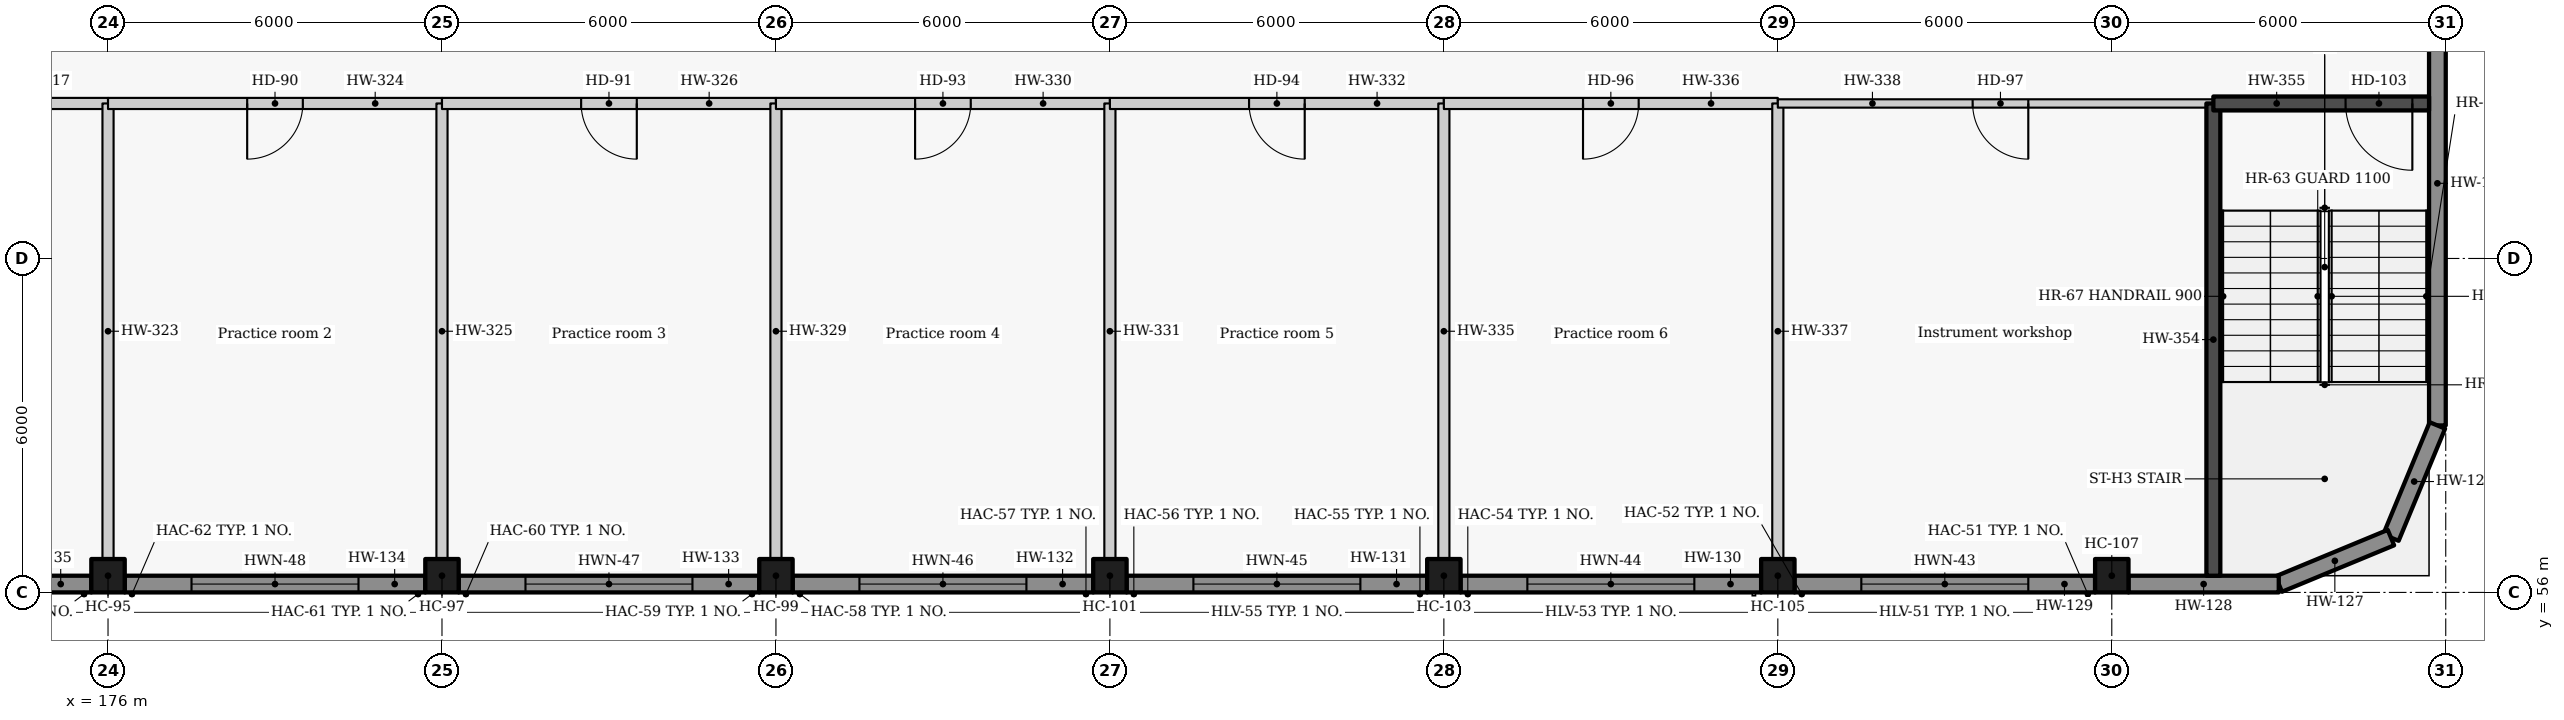
"""IFC4 building model, lengths in metres.
Left out: names, types, materials, properties, quantities, classifications, styles, units other than length and angle.
Written with IfcOpenShell. Run it as: python <this file> out.ifc"""

import sys

from ifc_helpers import new_model, si_unit, direction, frame, frame_2d, origin, origin_2d, place, context, subcontext, project, spatial, rectangle, extrude, element, fill, save


model = new_model("IFC4")
c1 = context("Model", 3, precision=1e-05, world=origin(), true_north=direction((0.0, 1.0)))
c2 = subcontext(c1, "Body", "Model", "MODEL_VIEW")
j1 = project(units=[si_unit("LENGTHUNIT", "METRE"), si_unit("PLANEANGLEUNIT", "RADIAN")], contexts=[c1])
p1 = place(None, origin())
s1 = spatial("IfcSite", under=j1, at=p1, CompositionType="ELEMENT")
p2 = place(p1, origin())
s2 = spatial("IfcBuilding", under=s1, at=p2, CompositionType="ELEMENT")
p3 = place(p2, frame((0.0, 0.0, 11.4)))
s3 = spatial("IfcBuildingStorey", under=s2, at=p3, CompositionType="ELEMENT", Elevation=11.4)
for number, where, z_axis, x_axis in (
    (1, (176.0, 56.3, 0.0), (0.0, 0.0, 1.0), (1.0, 0.0, 0.0)),
    (2, (182.0, 56.3, 0.0), (0.0, 0.0, 1.0), (1.0, 0.0, 0.0)),
    (3, (188.0, 56.3, 0.0), (0.0, 0.0, 1.0), (1.0, 0.0, 0.0)),
    (4, (194.0, 56.3, 0.0), (0.0, 0.0, 1.0), (1.0, 0.0, 0.0)),
    (5, (200.0, 56.3, 0.0), (0.0, 0.0, 1.0), (1.0, 0.0, 0.0)),
    (6, (206.0, 56.3, 0.0), (0.0, 0.0, 1.0), (1.0, 0.0, 0.0)),
    (7, (212.0, 56.3, 0.0), (0.0, 0.0, 1.0), (1.0, 0.0, 0.0)),
):
    element("IfcColumn", number, at=place(p3, frame(where, z_axis=z_axis, x_axis=x_axis)), inside=s3, PredefinedType="COLUMN", context=c2, shape_type="SweptSolid", body=[
        extrude(rectangle(XDim=0.6, YDim=0.6, at=origin_2d()), origin(), (0.0, 0.0, 1.0), 4.2),
    ])
p4 = place(p3, frame((217.85, 67.7, 0.0), z_axis=(0.0, 0.0, 1.0), x_axis=(0.0, -1.0, 0.0)))
e8 = element("IfcWall", 8, at=p4, inside=s3, PredefinedType="SOLIDWALL", context=c2, shape_type="SweptSolid", body=[
    extrude(rectangle(XDim=8.7, YDim=0.3, at=frame_2d((4.35, 0.0))), origin(), (0.0, 0.0, 1.0), 4.2),
])
for number, where, z_axis, x_axis in (
    (9, (217.85, 59.0, 0.0), (0.0, 0.0, 1.0), (-0.383, -0.924, 0.0)),
    (10, (217.015, 56.985, 0.0), (0.0, 0.0, 1.0), (-0.924, -0.383, 0.0)),
):
    element("IfcWall", number, at=place(p3, frame(where, z_axis=z_axis, x_axis=x_axis)), inside=s3, PredefinedType="SOLIDWALL", context=c2, shape_type="SweptSolid", body=[
        extrude(rectangle(XDim=2.181, YDim=0.3, at=frame_2d((1.091, 0.0))), origin(), (0.0, 0.0, 1.0), 4.2),
    ])
p5 = place(p3, frame((215.0, 56.15, 0.0), z_axis=(0.0, 0.0, 1.0), x_axis=(-1.0, 0.0, 0.0)))
e11 = element("IfcWall", 11, at=p5, inside=s3, PredefinedType="SOLIDWALL", context=c2, shape_type="SweptSolid", body=[
    extrude(rectangle(XDim=2.7, YDim=0.3, at=frame_2d((1.35, 0.0))), origin(), (0.0, 0.0, 1.0), 4.2),
])
p6 = place(p3, frame((211.7, 56.15, 0.0), z_axis=(0.0, 0.0, 1.0), x_axis=(-1.0, 0.0, 0.0)))
e12 = element("IfcWall", 12, at=p6, inside=s3, PredefinedType="SOLIDWALL", context=c2, shape_type="SweptSolid", body=[
    extrude(rectangle(XDim=5.4, YDim=0.3, at=frame_2d((2.7, 0.0))), origin(), (0.0, 0.0, 1.0), 4.2),
])
p7 = place(p6, frame((1.2, 0.0, 0.9)))
e13 = element("IfcOpeningElement", 13, at=p7, cuts=e12, PredefinedType="OPENING", context=c2, shape_type="SweptSolid", body=[
    extrude(rectangle(XDim=3.0, YDim=1.8, at=frame_2d((1.5, 0.9))), frame((0.0, 0.16, 0.0), z_axis=(0.0, -1.0, 0.0), x_axis=(1.0, 0.0, 0.0)), (0.0, 0.0, 1.0), 0.32),
])
p8 = place(p3, frame((205.7, 56.15, 0.0), z_axis=(0.0, 0.0, 1.0), x_axis=(-1.0, 0.0, 0.0)))
e14 = element("IfcWall", 14, at=p8, inside=s3, PredefinedType="SOLIDWALL", context=c2, shape_type="SweptSolid", body=[
    extrude(rectangle(XDim=5.4, YDim=0.3, at=frame_2d((2.7, 0.0))), origin(), (0.0, 0.0, 1.0), 4.2),
])
p9 = place(p8, frame((1.2, 0.0, 0.9)))
e15 = element("IfcOpeningElement", 15, at=p9, cuts=e14, PredefinedType="OPENING", context=c2, shape_type="SweptSolid", body=[
    extrude(rectangle(XDim=3.0, YDim=1.8, at=frame_2d((1.5, 0.9))), frame((0.0, 0.16, 0.0), z_axis=(0.0, -1.0, 0.0), x_axis=(1.0, 0.0, 0.0)), (0.0, 0.0, 1.0), 0.32),
])
p10 = place(p3, frame((199.7, 56.15, 0.0), z_axis=(0.0, 0.0, 1.0), x_axis=(-1.0, 0.0, 0.0)))
e16 = element("IfcWall", 16, at=p10, inside=s3, PredefinedType="SOLIDWALL", context=c2, shape_type="SweptSolid", body=[
    extrude(rectangle(XDim=5.4, YDim=0.3, at=frame_2d((2.7, 0.0))), origin(), (0.0, 0.0, 1.0), 4.2),
])
p11 = place(p10, frame((1.2, 0.0, 0.9)))
e17 = element("IfcOpeningElement", 17, at=p11, cuts=e16, PredefinedType="OPENING", context=c2, shape_type="SweptSolid", body=[
    extrude(rectangle(XDim=3.0, YDim=1.8, at=frame_2d((1.5, 0.9))), frame((0.0, 0.16, 0.0), z_axis=(0.0, -1.0, 0.0), x_axis=(1.0, 0.0, 0.0)), (0.0, 0.0, 1.0), 0.32),
])
p12 = place(p3, frame((193.7, 56.15, 0.0), z_axis=(0.0, 0.0, 1.0), x_axis=(-1.0, 0.0, 0.0)))
e18 = element("IfcWall", 18, at=p12, inside=s3, PredefinedType="SOLIDWALL", context=c2, shape_type="SweptSolid", body=[
    extrude(rectangle(XDim=5.4, YDim=0.3, at=frame_2d((2.7, 0.0))), origin(), (0.0, 0.0, 1.0), 4.2),
])
p13 = place(p12, frame((1.2, 0.0, 0.9)))
e19 = element("IfcOpeningElement", 19, at=p13, cuts=e18, PredefinedType="OPENING", context=c2, shape_type="SweptSolid", body=[
    extrude(rectangle(XDim=3.0, YDim=1.8, at=frame_2d((1.5, 0.9))), frame((0.0, 0.16, 0.0), z_axis=(0.0, -1.0, 0.0), x_axis=(1.0, 0.0, 0.0)), (0.0, 0.0, 1.0), 0.32),
])
p14 = place(p3, frame((187.7, 56.15, 0.0), z_axis=(0.0, 0.0, 1.0), x_axis=(-1.0, 0.0, 0.0)))
e20 = element("IfcWall", 20, at=p14, inside=s3, PredefinedType="SOLIDWALL", context=c2, shape_type="SweptSolid", body=[
    extrude(rectangle(XDim=5.4, YDim=0.3, at=frame_2d((2.7, 0.0))), origin(), (0.0, 0.0, 1.0), 4.2),
])
p15 = place(p14, frame((1.2, 0.0, 0.9)))
e21 = element("IfcOpeningElement", 21, at=p15, cuts=e20, PredefinedType="OPENING", context=c2, shape_type="SweptSolid", body=[
    extrude(rectangle(XDim=3.0, YDim=1.8, at=frame_2d((1.5, 0.9))), frame((0.0, 0.16, 0.0), z_axis=(0.0, -1.0, 0.0), x_axis=(1.0, 0.0, 0.0)), (0.0, 0.0, 1.0), 0.32),
])
p16 = place(p3, frame((181.7, 56.15, 0.0), z_axis=(0.0, 0.0, 1.0), x_axis=(-1.0, 0.0, 0.0)))
e22 = element("IfcWall", 22, at=p16, inside=s3, PredefinedType="SOLIDWALL", context=c2, shape_type="SweptSolid", body=[
    extrude(rectangle(XDim=5.4, YDim=0.3, at=frame_2d((2.7, 0.0))), origin(), (0.0, 0.0, 1.0), 4.2),
])
p17 = place(p16, frame((1.2, 0.0, 0.9)))
e23 = element("IfcOpeningElement", 23, at=p17, cuts=e22, PredefinedType="OPENING", context=c2, shape_type="SweptSolid", body=[
    extrude(rectangle(XDim=3.0, YDim=1.8, at=frame_2d((1.5, 0.9))), frame((0.0, 0.16, 0.0), z_axis=(0.0, -1.0, 0.0), x_axis=(1.0, 0.0, 0.0)), (0.0, 0.0, 1.0), 0.32),
])
p18 = place(p3, frame((175.7, 56.15, 0.0), z_axis=(0.0, 0.0, 1.0), x_axis=(-1.0, 0.0, 0.0)))
e24 = element("IfcWall", 24, at=p18, inside=s3, PredefinedType="SOLIDWALL", context=c2, shape_type="SweptSolid", body=[
    extrude(rectangle(XDim=5.4, YDim=0.3, at=frame_2d((2.7, 0.0))), origin(), (0.0, 0.0, 1.0), 4.2),
])
p19 = place(p18, frame((1.2, 0.0, 0.9)))
e25 = element("IfcOpeningElement", 25, at=p19, cuts=e24, PredefinedType="OPENING", context=c2, shape_type="SweptSolid", body=[
    extrude(rectangle(XDim=3.0, YDim=1.8, at=frame_2d((1.5, 0.9))), frame((0.0, 0.16, 0.0), z_axis=(0.0, -1.0, 0.0), x_axis=(1.0, 0.0, 0.0)), (0.0, 0.0, 1.0), 0.32),
])
p20 = place(p3, frame((176.0, 64.785, 0.0), z_axis=(0.0, 0.0, 1.0), x_axis=(-1.0, 0.0, 0.0)))
e26 = element("IfcWall", 26, at=p20, inside=s3, PredefinedType="PARTITIONING", context=c2, shape_type="SweptSolid", body=[
    extrude(rectangle(XDim=6.0, YDim=0.2, at=frame_2d((3.0, 0.0))), origin(), (0.0, 0.0, 1.0), 3.85),
])
p21 = place(p20, frame((2.5, 0.0, 0.0)))
e27 = element("IfcOpeningElement", 27, at=p21, cuts=e26, PredefinedType="OPENING", context=c2, shape_type="SweptSolid", body=[
    extrude(rectangle(XDim=1.0, YDim=2.1, at=frame_2d((0.5, 1.05))), frame((0.0, 0.11, 0.0), z_axis=(0.0, -1.0, 0.0), x_axis=(1.0, 0.0, 0.0)), (0.0, 0.0, 1.0), 0.22),
])
p22 = place(p3, frame((176.0, 64.785, 0.0), z_axis=(0.0, 0.0, 1.0), x_axis=(0.0, -1.0, 0.0)))
e28 = element("IfcWall", 28, at=p22, inside=s3, PredefinedType="PARTITIONING", context=c2, shape_type="SweptSolid", body=[
    extrude(rectangle(XDim=8.185, YDim=0.2, at=frame_2d((4.092, 0.0))), origin(), (0.0, 0.0, 1.0), 3.85),
])
p23 = place(p3, frame((182.0, 64.785, 0.0), z_axis=(0.0, 0.0, 1.0), x_axis=(-1.0, 0.0, 0.0)))
e29 = element("IfcWall", 29, at=p23, inside=s3, PredefinedType="PARTITIONING", context=c2, shape_type="SweptSolid", body=[
    extrude(rectangle(XDim=6.0, YDim=0.2, at=frame_2d((3.0, 0.0))), origin(), (0.0, 0.0, 1.0), 3.85),
])
p24 = place(p23, frame((2.5, 0.0, 0.0)))
e30 = element("IfcOpeningElement", 30, at=p24, cuts=e29, PredefinedType="OPENING", context=c2, shape_type="SweptSolid", body=[
    extrude(rectangle(XDim=1.0, YDim=2.1, at=frame_2d((0.5, 1.05))), frame((0.0, 0.11, 0.0), z_axis=(0.0, -1.0, 0.0), x_axis=(1.0, 0.0, 0.0)), (0.0, 0.0, 1.0), 0.22),
])
p25 = place(p3, frame((182.0, 64.785, 0.0), z_axis=(0.0, 0.0, 1.0), x_axis=(0.0, -1.0, 0.0)))
e31 = element("IfcWall", 31, at=p25, inside=s3, PredefinedType="PARTITIONING", context=c2, shape_type="SweptSolid", body=[
    extrude(rectangle(XDim=8.185, YDim=0.2, at=frame_2d((4.092, 0.0))), origin(), (0.0, 0.0, 1.0), 3.85),
])
p26 = place(p3, frame((188.0, 64.785, 0.0), z_axis=(0.0, 0.0, 1.0), x_axis=(-1.0, 0.0, 0.0)))
e32 = element("IfcWall", 32, at=p26, inside=s3, PredefinedType="PARTITIONING", context=c2, shape_type="SweptSolid", body=[
    extrude(rectangle(XDim=6.0, YDim=0.2, at=frame_2d((3.0, 0.0))), origin(), (0.0, 0.0, 1.0), 3.85),
])
p27 = place(p26, frame((2.5, 0.0, 0.0)))
e33 = element("IfcOpeningElement", 33, at=p27, cuts=e32, PredefinedType="OPENING", context=c2, shape_type="SweptSolid", body=[
    extrude(rectangle(XDim=1.0, YDim=2.1, at=frame_2d((0.5, 1.05))), frame((0.0, 0.11, 0.0), z_axis=(0.0, -1.0, 0.0), x_axis=(1.0, 0.0, 0.0)), (0.0, 0.0, 1.0), 0.22),
])
p28 = place(p3, frame((188.0, 64.785, 0.0), z_axis=(0.0, 0.0, 1.0), x_axis=(0.0, -1.0, 0.0)))
e34 = element("IfcWall", 34, at=p28, inside=s3, PredefinedType="PARTITIONING", context=c2, shape_type="SweptSolid", body=[
    extrude(rectangle(XDim=8.185, YDim=0.2, at=frame_2d((4.092, 0.0))), origin(), (0.0, 0.0, 1.0), 3.85),
])
p29 = place(p3, frame((194.0, 64.785, 0.0), z_axis=(0.0, 0.0, 1.0), x_axis=(-1.0, 0.0, 0.0)))
e35 = element("IfcWall", 35, at=p29, inside=s3, PredefinedType="PARTITIONING", context=c2, shape_type="SweptSolid", body=[
    extrude(rectangle(XDim=6.0, YDim=0.2, at=frame_2d((3.0, 0.0))), origin(), (0.0, 0.0, 1.0), 3.85),
])
p30 = place(p29, frame((2.5, 0.0, 0.0)))
e36 = element("IfcOpeningElement", 36, at=p30, cuts=e35, PredefinedType="OPENING", context=c2, shape_type="SweptSolid", body=[
    extrude(rectangle(XDim=1.0, YDim=2.1, at=frame_2d((0.5, 1.05))), frame((0.0, 0.11, 0.0), z_axis=(0.0, -1.0, 0.0), x_axis=(1.0, 0.0, 0.0)), (0.0, 0.0, 1.0), 0.22),
])
p31 = place(p3, frame((194.0, 64.785, 0.0), z_axis=(0.0, 0.0, 1.0), x_axis=(0.0, -1.0, 0.0)))
e37 = element("IfcWall", 37, at=p31, inside=s3, PredefinedType="PARTITIONING", context=c2, shape_type="SweptSolid", body=[
    extrude(rectangle(XDim=8.185, YDim=0.2, at=frame_2d((4.092, 0.0))), origin(), (0.0, 0.0, 1.0), 3.85),
])
p32 = place(p3, frame((200.0, 64.785, 0.0), z_axis=(0.0, 0.0, 1.0), x_axis=(-1.0, 0.0, 0.0)))
e38 = element("IfcWall", 38, at=p32, inside=s3, PredefinedType="PARTITIONING", context=c2, shape_type="SweptSolid", body=[
    extrude(rectangle(XDim=6.0, YDim=0.2, at=frame_2d((3.0, 0.0))), origin(), (0.0, 0.0, 1.0), 3.85),
])
p33 = place(p32, frame((2.5, 0.0, 0.0)))
e39 = element("IfcOpeningElement", 39, at=p33, cuts=e38, PredefinedType="OPENING", context=c2, shape_type="SweptSolid", body=[
    extrude(rectangle(XDim=1.0, YDim=2.1, at=frame_2d((0.5, 1.05))), frame((0.0, 0.11, 0.0), z_axis=(0.0, -1.0, 0.0), x_axis=(1.0, 0.0, 0.0)), (0.0, 0.0, 1.0), 0.22),
])
p34 = place(p3, frame((200.0, 64.785, 0.0), z_axis=(0.0, 0.0, 1.0), x_axis=(0.0, -1.0, 0.0)))
e40 = element("IfcWall", 40, at=p34, inside=s3, PredefinedType="PARTITIONING", context=c2, shape_type="SweptSolid", body=[
    extrude(rectangle(XDim=8.185, YDim=0.2, at=frame_2d((4.092, 0.0))), origin(), (0.0, 0.0, 1.0), 3.85),
])
p35 = place(p3, frame((206.0, 64.785, 0.0), z_axis=(0.0, 0.0, 1.0), x_axis=(-1.0, 0.0, 0.0)))
e41 = element("IfcWall", 41, at=p35, inside=s3, PredefinedType="PARTITIONING", context=c2, shape_type="SweptSolid", body=[
    extrude(rectangle(XDim=6.0, YDim=0.2, at=frame_2d((3.0, 0.0))), origin(), (0.0, 0.0, 1.0), 3.85),
])
p36 = place(p35, frame((2.5, 0.0, 0.0)))
e42 = element("IfcOpeningElement", 42, at=p36, cuts=e41, PredefinedType="OPENING", context=c2, shape_type="SweptSolid", body=[
    extrude(rectangle(XDim=1.0, YDim=2.1, at=frame_2d((0.5, 1.05))), frame((0.0, 0.11, 0.0), z_axis=(0.0, -1.0, 0.0), x_axis=(1.0, 0.0, 0.0)), (0.0, 0.0, 1.0), 0.22),
])
p37 = place(p3, frame((206.0, 64.785, 0.0), z_axis=(0.0, 0.0, 1.0), x_axis=(0.0, -1.0, 0.0)))
e43 = element("IfcWall", 43, at=p37, inside=s3, PredefinedType="PARTITIONING", context=c2, shape_type="SweptSolid", body=[
    extrude(rectangle(XDim=8.185, YDim=0.2, at=frame_2d((4.092, 0.0))), origin(), (0.0, 0.0, 1.0), 3.85),
])
p38 = place(p3, frame((213.825, 64.785, 0.0), z_axis=(0.0, 0.0, 1.0), x_axis=(-1.0, 0.0, 0.0)))
e44 = element("IfcWall", 44, at=p38, inside=s3, PredefinedType="PARTITIONING", context=c2, shape_type="SweptSolid", body=[
    extrude(rectangle(XDim=7.825, YDim=0.15, at=frame_2d((3.913, 0.0))), origin(), (0.0, 0.0, 1.0), 3.85),
])
p39 = place(p38, frame((3.325, 0.0, 0.0)))
e45 = element("IfcOpeningElement", 45, at=p39, cuts=e44, PredefinedType="OPENING", context=c2, shape_type="SweptSolid", body=[
    extrude(rectangle(XDim=1.0, YDim=2.1, at=frame_2d((0.5, 1.05))), frame((0.0, 0.085, 0.0), z_axis=(0.0, -1.0, 0.0), x_axis=(1.0, 0.0, 0.0)), (0.0, 0.0, 1.0), 0.17),
])
p40 = place(p3, frame((213.825, 56.3, 0.0), z_axis=(0.0, 0.0, 1.0), x_axis=(0.0, 1.0, 0.0)))
e46 = element("IfcWall", 46, at=p40, inside=s3, PredefinedType="SOLIDWALL", context=c2, shape_type="SweptSolid", body=[
    extrude(rectangle(XDim=8.485, YDim=0.25, at=frame_2d((4.242, 0.0))), origin(), (0.0, 0.0, 1.0), 4.2),
])
p41 = place(p3, frame((217.7, 64.785, 0.0), z_axis=(0.0, 0.0, 1.0), x_axis=(-1.0, 0.0, 0.0)))
e47 = element("IfcWall", 47, at=p41, inside=s3, PredefinedType="SOLIDWALL", context=c2, shape_type="SweptSolid", body=[
    extrude(rectangle(XDim=3.875, YDim=0.25, at=frame_2d((1.938, 0.0))), origin(), (0.0, 0.0, 1.0), 4.2),
])
p42 = place(p41, frame((0.3, 0.0, 0.0)))
e48 = element("IfcOpeningElement", 48, at=p42, cuts=e47, PredefinedType="OPENING", context=c2, shape_type="SweptSolid", body=[
    extrude(rectangle(XDim=1.2, YDim=2.1, at=frame_2d((0.6, 1.05))), frame((0.0, 0.135, 0.0), z_axis=(0.0, -1.0, 0.0), x_axis=(1.0, 0.0, 0.0)), (0.0, 0.0, 1.0), 0.27),
])
p43 = place(p7, origin())
e49 = element("IfcWindow", 49, at=p43, inside=s3, PartitioningType="SINGLE_PANEL", PredefinedType="WINDOW", context=c2, shape_type="SweptSolid", body=[
    extrude(rectangle(XDim=3.0, YDim=1.8, at=frame_2d((1.5, 0.9))), frame((0.0, 0.03, 0.0), z_axis=(0.0, -1.0, 0.0), x_axis=(1.0, 0.0, 0.0)), (0.0, 0.0, 1.0), 0.06),
])
fill(e13, e49)
p44 = place(p9, origin())
e50 = element("IfcWindow", 50, at=p44, inside=s3, PartitioningType="SINGLE_PANEL", PredefinedType="WINDOW", context=c2, shape_type="SweptSolid", body=[
    extrude(rectangle(XDim=3.0, YDim=1.8, at=frame_2d((1.5, 0.9))), frame((0.0, 0.03, 0.0), z_axis=(0.0, -1.0, 0.0), x_axis=(1.0, 0.0, 0.0)), (0.0, 0.0, 1.0), 0.06),
])
fill(e15, e50)
p45 = place(p11, origin())
e51 = element("IfcWindow", 51, at=p45, inside=s3, PartitioningType="SINGLE_PANEL", PredefinedType="WINDOW", context=c2, shape_type="SweptSolid", body=[
    extrude(rectangle(XDim=3.0, YDim=1.8, at=frame_2d((1.5, 0.9))), frame((0.0, 0.03, 0.0), z_axis=(0.0, -1.0, 0.0), x_axis=(1.0, 0.0, 0.0)), (0.0, 0.0, 1.0), 0.06),
])
fill(e17, e51)
p46 = place(p13, origin())
e52 = element("IfcWindow", 52, at=p46, inside=s3, PartitioningType="SINGLE_PANEL", PredefinedType="WINDOW", context=c2, shape_type="SweptSolid", body=[
    extrude(rectangle(XDim=3.0, YDim=1.8, at=frame_2d((1.5, 0.9))), frame((0.0, 0.03, 0.0), z_axis=(0.0, -1.0, 0.0), x_axis=(1.0, 0.0, 0.0)), (0.0, 0.0, 1.0), 0.06),
])
fill(e19, e52)
p47 = place(p15, origin())
e53 = element("IfcWindow", 53, at=p47, inside=s3, PartitioningType="SINGLE_PANEL", PredefinedType="WINDOW", context=c2, shape_type="SweptSolid", body=[
    extrude(rectangle(XDim=3.0, YDim=1.8, at=frame_2d((1.5, 0.9))), frame((0.0, 0.03, 0.0), z_axis=(0.0, -1.0, 0.0), x_axis=(1.0, 0.0, 0.0)), (0.0, 0.0, 1.0), 0.06),
])
fill(e21, e53)
p48 = place(p17, origin())
e54 = element("IfcWindow", 54, at=p48, inside=s3, PartitioningType="SINGLE_PANEL", PredefinedType="WINDOW", context=c2, shape_type="SweptSolid", body=[
    extrude(rectangle(XDim=3.0, YDim=1.8, at=frame_2d((1.5, 0.9))), frame((0.0, 0.03, 0.0), z_axis=(0.0, -1.0, 0.0), x_axis=(1.0, 0.0, 0.0)), (0.0, 0.0, 1.0), 0.06),
])
fill(e23, e54)
p49 = place(p24, origin())
e55 = element("IfcDoor", 55, at=p49, inside=s3, OperationType="SINGLE_SWING_RIGHT", PredefinedType="DOOR", context=c2, shape_type="SweptSolid", body=[
    extrude(rectangle(XDim=1.0, YDim=2.1, at=frame_2d((0.5, 1.05))), frame((0.0, 0.025, 0.0), z_axis=(0.0, -1.0, 0.0), x_axis=(1.0, 0.0, 0.0)), (0.0, 0.0, 1.0), 0.05),
])
fill(e30, e55)
p50 = place(p27, origin())
e56 = element("IfcDoor", 56, at=p50, inside=s3, OperationType="SINGLE_SWING_LEFT", PredefinedType="DOOR", context=c2, shape_type="SweptSolid", body=[
    extrude(rectangle(XDim=1.0, YDim=2.1, at=frame_2d((0.5, 1.05))), frame((0.0, 0.025, 0.0), z_axis=(0.0, -1.0, 0.0), x_axis=(1.0, 0.0, 0.0)), (0.0, 0.0, 1.0), 0.05),
])
fill(e33, e56)
p51 = place(p30, origin())
e57 = element("IfcDoor", 57, at=p51, inside=s3, OperationType="SINGLE_SWING_RIGHT", PredefinedType="DOOR", context=c2, shape_type="SweptSolid", body=[
    extrude(rectangle(XDim=1.0, YDim=2.1, at=frame_2d((0.5, 1.05))), frame((0.0, 0.025, 0.0), z_axis=(0.0, -1.0, 0.0), x_axis=(1.0, 0.0, 0.0)), (0.0, 0.0, 1.0), 0.05),
])
fill(e36, e57)
p52 = place(p33, origin())
e58 = element("IfcDoor", 58, at=p52, inside=s3, OperationType="SINGLE_SWING_LEFT", PredefinedType="DOOR", context=c2, shape_type="SweptSolid", body=[
    extrude(rectangle(XDim=1.0, YDim=2.1, at=frame_2d((0.5, 1.05))), frame((0.0, 0.025, 0.0), z_axis=(0.0, -1.0, 0.0), x_axis=(1.0, 0.0, 0.0)), (0.0, 0.0, 1.0), 0.05),
])
fill(e39, e58)
p53 = place(p36, origin())
e59 = element("IfcDoor", 59, at=p53, inside=s3, OperationType="SINGLE_SWING_RIGHT", PredefinedType="DOOR", context=c2, shape_type="SweptSolid", body=[
    extrude(rectangle(XDim=1.0, YDim=2.1, at=frame_2d((0.5, 1.05))), frame((0.0, 0.025, 0.0), z_axis=(0.0, -1.0, 0.0), x_axis=(1.0, 0.0, 0.0)), (0.0, 0.0, 1.0), 0.05),
])
fill(e42, e59)
p54 = place(p39, origin())
e60 = element("IfcDoor", 60, at=p54, inside=s3, OperationType="SINGLE_SWING_LEFT", PredefinedType="DOOR", context=c2, shape_type="SweptSolid", body=[
    extrude(rectangle(XDim=1.0, YDim=2.1, at=frame_2d((0.5, 1.05))), frame((0.0, 0.025, 0.0), z_axis=(0.0, -1.0, 0.0), x_axis=(1.0, 0.0, 0.0)), (0.0, 0.0, 1.0), 0.05),
])
fill(e45, e60)
p55 = place(p42, origin())
e61 = element("IfcDoor", 61, at=p55, inside=s3, OperationType="SINGLE_SWING_LEFT", PredefinedType="DOOR", context=c2, shape_type="SweptSolid", body=[
    extrude(rectangle(XDim=1.2, YDim=2.1, at=frame_2d((0.6, 1.05))), frame((0.0, 0.025, 0.0), z_axis=(0.0, -1.0, 0.0), x_axis=(1.0, 0.0, 0.0)), (0.0, 0.0, 1.0), 0.05),
])
fill(e48, e61)
save(model, sys.argv[1])
